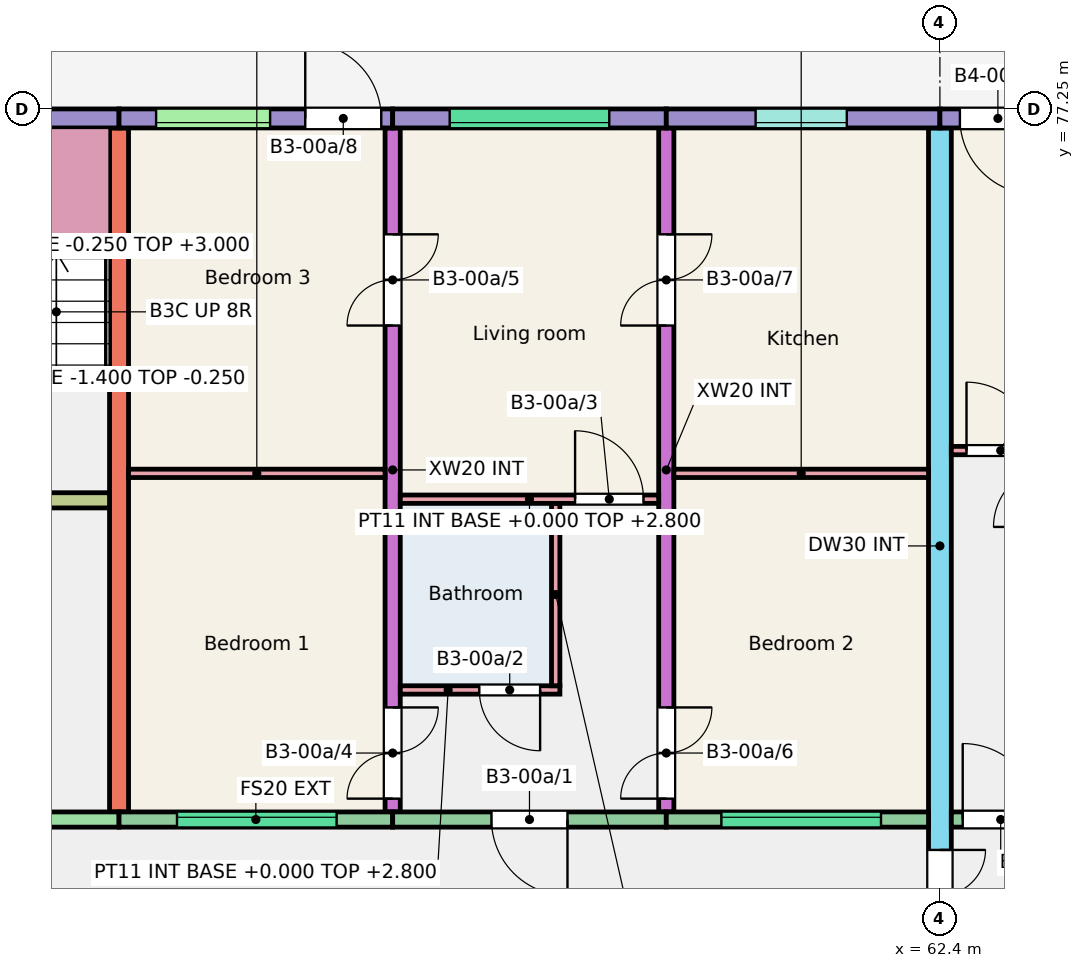
"""IFC4 building model, lengths in metres.
Left out: names, types, materials, properties, quantities, classifications, styles, units other than length and angle.
Written with IfcOpenShell. Run it as: python <this file> out.ifc"""

import sys

from ifc_helpers import new_model, si_unit, direction, frame, frame_2d, origin, place, context, subcontext, project, spatial, rectangle, extrude, element, fill, save


model = new_model("IFC4")
c1 = context("Model", 3, precision=1e-05, world=origin(), true_north=direction((0.0, 1.0)))
c2 = subcontext(c1, "Body", "Model", "MODEL_VIEW")
j1 = project(units=[si_unit("LENGTHUNIT", "METRE"), si_unit("PLANEANGLEUNIT", "RADIAN")], contexts=[c1])
p1 = place(None, origin())
s1 = spatial("IfcSite", under=j1, at=p1, CompositionType="ELEMENT")
p2 = place(p1, origin())
s2 = spatial("IfcBuilding", under=s1, at=p2, CompositionType="ELEMENT")
p3 = place(p2, origin())
s3 = spatial("IfcBuildingStorey", under=s2, at=p3, CompositionType="ELEMENT", Elevation=0.0)
p4 = place(p3, frame((51.6, 68.0, -0.25), z_axis=(0.0, 0.0, 1.0), x_axis=(0.0, 1.0, 0.0)))
e1 = element("IfcWall", 1, at=p4, inside=s3, PredefinedType="SHEAR", context=c2, shape_type="SweptSolid", body=[
    extrude(rectangle(XDim=9.0, YDim=0.25, at=frame_2d((4.5, 0.0))), origin(), (0.0, 0.0, 1.0), 3.25),
])
p5 = place(p3, frame((55.2, 68.0, -0.25), z_axis=(0.0, 0.0, 1.0), x_axis=(0.0, 1.0, 0.0)))
e2 = element("IfcWall", 2, at=p5, inside=s3, PredefinedType="SHEAR", context=c2, shape_type="SweptSolid", body=[
    extrude(rectangle(XDim=9.0, YDim=0.2, at=frame_2d((4.5, 0.0))), origin(), (0.0, 0.0, 1.0), 3.25),
])
p6 = place(p5, frame((0.175, 0.0, 0.25)))
e3 = element("IfcOpeningElement", 3, at=p6, cuts=e2, PredefinedType="OPENING", context=c2, shape_type="SweptSolid", body=[
    extrude(rectangle(XDim=1.2, YDim=2.1, at=frame_2d((0.6, 1.05))), frame((0.0, 0.11, 0.0), z_axis=(0.0, -1.0, 0.0), x_axis=(1.0, 0.0, 0.0)), (0.0, 0.0, 1.0), 0.22),
])
p7 = place(p5, frame((6.4, 0.0, 0.25)))
e4 = element("IfcOpeningElement", 4, at=p7, cuts=e2, PredefinedType="OPENING", context=c2, shape_type="SweptSolid", body=[
    extrude(rectangle(XDim=1.2, YDim=2.1, at=frame_2d((0.6, 1.05))), frame((0.0, 0.11, 0.0), z_axis=(0.0, -1.0, 0.0), x_axis=(1.0, 0.0, 0.0)), (0.0, 0.0, 1.0), 0.22),
])
p8 = place(p3, frame((58.8, 68.0, -0.25), z_axis=(0.0, 0.0, 1.0), x_axis=(0.0, 1.0, 0.0)))
e5 = element("IfcWall", 5, at=p8, inside=s3, PredefinedType="SHEAR", context=c2, shape_type="SweptSolid", body=[
    extrude(rectangle(XDim=9.0, YDim=0.2, at=frame_2d((4.5, 0.0))), origin(), (0.0, 0.0, 1.0), 3.25),
])
p9 = place(p8, frame((0.175, 0.0, 0.25)))
e6 = element("IfcOpeningElement", 6, at=p9, cuts=e5, PredefinedType="OPENING", context=c2, shape_type="SweptSolid", body=[
    extrude(rectangle(XDim=1.2, YDim=2.1, at=frame_2d((0.6, 1.05))), frame((0.0, 0.11, 0.0), z_axis=(0.0, -1.0, 0.0), x_axis=(1.0, 0.0, 0.0)), (0.0, 0.0, 1.0), 0.22),
])
p10 = place(p8, frame((6.4, 0.0, 0.25)))
e7 = element("IfcOpeningElement", 7, at=p10, cuts=e5, PredefinedType="OPENING", context=c2, shape_type="SweptSolid", body=[
    extrude(rectangle(XDim=1.2, YDim=2.1, at=frame_2d((0.6, 1.05))), frame((0.0, 0.11, 0.0), z_axis=(0.0, -1.0, 0.0), x_axis=(1.0, 0.0, 0.0)), (0.0, 0.0, 1.0), 0.22),
])
p11 = place(p3, frame((62.4, 66.0, -0.25), z_axis=(0.0, 0.0, 1.0), x_axis=(0.0, 1.0, 0.0)))
e8 = element("IfcWall", 8, at=p11, inside=s3, PredefinedType="SHEAR", context=c2, shape_type="SweptSolid", body=[
    extrude(rectangle(XDim=11.0, YDim=0.3, at=frame_2d((5.5, 0.0))), origin(), (0.0, 0.0, 1.0), 3.25),
])
p12 = place(p11, frame((0.3, 0.0, 0.25)))
e9 = element("IfcOpeningElement", 9, at=p12, cuts=e8, PredefinedType="OPENING", context=c2, shape_type="SweptSolid", body=[
    extrude(rectangle(XDim=1.2, YDim=2.1, at=frame_2d((0.6, 1.05))), frame((0.0, 0.16, 0.0), z_axis=(0.0, -1.0, 0.0), x_axis=(1.0, 0.0, 0.0)), (0.0, 0.0, 1.0), 0.32),
])
p13 = place(p3, frame((45.6, 77.125, -0.25), z_axis=(0.0, 0.0, 1.0), x_axis=(1.0, 0.0, 0.0)))
e10 = element("IfcWall", 10, at=p13, inside=s3, PredefinedType="SOLIDWALL", context=c2, shape_type="SweptSolid", body=[
    extrude(rectangle(XDim=6.0, YDim=0.25, at=frame_2d((3.0, 0.0))), origin(), (0.0, 0.0, 1.0), 3.25),
])
p14 = place(p13, frame((3.875, 0.0, 0.25)))
e11 = element("IfcOpeningElement", 11, at=p14, cuts=e10, PredefinedType="OPENING", context=c2, shape_type="SweptSolid", body=[
    extrude(rectangle(XDim=1.1, YDim=2.1, at=frame_2d((0.55, 1.05))), frame((0.0, 0.135, 0.0), z_axis=(0.0, -1.0, 0.0), x_axis=(1.0, 0.0, 0.0)), (0.0, 0.0, 1.0), 0.27),
])
p15 = place(p3, frame((45.75, 67.9, -0.25), z_axis=(0.0, 0.0, 1.0), x_axis=(1.0, 0.0, 0.0)))
e12 = element("IfcWall", 12, at=p15, inside=s3, PredefinedType="SHEAR", context=c2, shape_type="SweptSolid", body=[
    extrude(rectangle(XDim=5.85, YDim=0.2, at=frame_2d((2.925, 0.0))), origin(), (0.0, 0.0, 1.0), 3.25),
])
p16 = place(p15, frame((2.312, 0.0, 0.25)))
e13 = element("IfcOpeningElement", 13, at=p16, cuts=e12, PredefinedType="OPENING", context=c2, shape_type="SweptSolid", body=[
    extrude(rectangle(XDim=1.1, YDim=2.1, at=frame_2d((0.55, 1.05))), frame((0.0, 0.11, 0.0), z_axis=(0.0, -1.0, 0.0), x_axis=(1.0, 0.0, 0.0)), (0.0, 0.0, 1.0), 0.22),
])
p17 = place(p3, frame((45.75, 72.1, -0.25), z_axis=(0.0, 0.0, 1.0), x_axis=(1.0, 0.0, 0.0)))
e14 = element("IfcWall", 14, at=p17, inside=s3, PredefinedType="SHEAR", context=c2, shape_type="SweptSolid", body=[
    extrude(rectangle(XDim=5.725, YDim=0.2, at=frame_2d((2.863, 0.0))), origin(), (0.0, 0.0, 1.0), 3.25),
])
p18 = place(p17, frame((3.775, 0.0, 0.25)))
e15 = element("IfcOpeningElement", 15, at=p18, cuts=e14, PredefinedType="OPENING", context=c2, shape_type="SweptSolid", body=[
    extrude(rectangle(XDim=1.0, YDim=2.1, at=frame_2d((0.5, 1.05))), frame((0.0, 0.11, 0.0), z_axis=(0.0, -1.0, 0.0), x_axis=(1.0, 0.0, 0.0)), (0.0, 0.0, 1.0), 0.22),
])
p19 = place(p17, frame((0.762, 0.0, 0.25)))
e16 = element("IfcOpeningElement", 16, at=p19, cuts=e14, PredefinedType="OPENING", context=c2, shape_type="SweptSolid", body=[
    extrude(rectangle(XDim=1.1, YDim=2.1, at=frame_2d((0.55, 1.05))), frame((0.0, 0.11, 0.0), z_axis=(0.0, -1.0, 0.0), x_axis=(1.0, 0.0, 0.0)), (0.0, 0.0, 1.0), 0.22),
])
p20 = place(p3, frame((51.6, 77.125, -0.25), z_axis=(0.0, 0.0, 1.0), x_axis=(1.0, 0.0, 0.0)))
e17 = element("IfcWall", 17, at=p20, inside=s3, PredefinedType="SOLIDWALL", context=c2, shape_type="SweptSolid", body=[
    extrude(rectangle(XDim=3.6, YDim=0.25, at=frame_2d((1.8, 0.0))), origin(), (0.0, 0.0, 1.0), 3.25),
])
p21 = place(p20, frame((0.488, 0.0, 1.45)))
e18 = element("IfcOpeningElement", 18, at=p21, cuts=e17, PredefinedType="OPENING", context=c2, shape_type="SweptSolid", body=[
    extrude(rectangle(XDim=1.5, YDim=1.2, at=frame_2d((0.75, 0.6))), frame((0.0, 0.135, 0.0), z_axis=(0.0, -1.0, 0.0), x_axis=(1.0, 0.0, 0.0)), (0.0, 0.0, 1.0), 0.27),
])
p22 = place(p20, frame((2.45, 0.0, 0.25)))
e19 = element("IfcOpeningElement", 19, at=p22, cuts=e17, PredefinedType="OPENING", context=c2, shape_type="SweptSolid", body=[
    extrude(rectangle(XDim=1.0, YDim=2.1, at=frame_2d((0.5, 1.05))), frame((0.0, 0.135, 0.0), z_axis=(0.0, -1.0, 0.0), x_axis=(1.0, 0.0, 0.0)), (0.0, 0.0, 1.0), 0.27),
])
p23 = place(p3, frame((51.6, 67.9, -0.25), z_axis=(0.0, 0.0, 1.0), x_axis=(1.0, 0.0, 0.0)))
e20 = element("IfcWall", 20, at=p23, inside=s3, PredefinedType="SOLIDWALL", context=c2, shape_type="SweptSolid", body=[
    extrude(rectangle(XDim=3.6, YDim=0.2, at=frame_2d((1.8, 0.0))), origin(), (0.0, 0.0, 1.0), 3.25),
])
p24 = place(p23, frame((0.762, 0.0, 1.45)))
e21 = element("IfcOpeningElement", 21, at=p24, cuts=e20, PredefinedType="OPENING", context=c2, shape_type="SweptSolid", body=[
    extrude(rectangle(XDim=2.1, YDim=1.2, at=frame_2d((1.05, 0.6))), frame((0.0, 0.11, 0.0), z_axis=(0.0, -1.0, 0.0), x_axis=(1.0, 0.0, 0.0)), (0.0, 0.0, 1.0), 0.22),
])
p25 = place(p3, frame((55.2, 77.125, -0.25), z_axis=(0.0, 0.0, 1.0), x_axis=(1.0, 0.0, 0.0)))
e22 = element("IfcWall", 22, at=p25, inside=s3, PredefinedType="SOLIDWALL", context=c2, shape_type="SweptSolid", body=[
    extrude(rectangle(XDim=3.6, YDim=0.25, at=frame_2d((1.8, 0.0))), origin(), (0.0, 0.0, 1.0), 3.25),
])
p26 = place(p25, frame((0.75, 0.0, 1.45)))
e23 = element("IfcOpeningElement", 23, at=p26, cuts=e22, PredefinedType="OPENING", context=c2, shape_type="SweptSolid", body=[
    extrude(rectangle(XDim=2.1, YDim=1.2, at=frame_2d((1.05, 0.6))), frame((0.0, 0.135, 0.0), z_axis=(0.0, -1.0, 0.0), x_axis=(1.0, 0.0, 0.0)), (0.0, 0.0, 1.0), 0.27),
])
p27 = place(p3, frame((55.2, 67.9, -0.25), z_axis=(0.0, 0.0, 1.0), x_axis=(1.0, 0.0, 0.0)))
e24 = element("IfcWall", 24, at=p27, inside=s3, PredefinedType="SOLIDWALL", context=c2, shape_type="SweptSolid", body=[
    extrude(rectangle(XDim=3.6, YDim=0.2, at=frame_2d((1.8, 0.0))), origin(), (0.0, 0.0, 1.0), 3.25),
])
p28 = place(p27, frame((1.3, 0.0, 0.25)))
e25 = element("IfcOpeningElement", 25, at=p28, cuts=e24, PredefinedType="OPENING", context=c2, shape_type="SweptSolid", body=[
    extrude(rectangle(XDim=1.0, YDim=2.1, at=frame_2d((0.5, 1.05))), frame((0.0, 0.11, 0.0), z_axis=(0.0, -1.0, 0.0), x_axis=(1.0, 0.0, 0.0)), (0.0, 0.0, 1.0), 0.22),
])
p29 = place(p3, frame((58.8, 77.125, -0.25), z_axis=(0.0, 0.0, 1.0), x_axis=(1.0, 0.0, 0.0)))
e26 = element("IfcWall", 26, at=p29, inside=s3, PredefinedType="SOLIDWALL", context=c2, shape_type="SweptSolid", body=[
    extrude(rectangle(XDim=3.6, YDim=0.25, at=frame_2d((1.8, 0.0))), origin(), (0.0, 0.0, 1.0), 3.25),
])
p30 = place(p29, frame((1.175, 0.0, 1.35)))
e27 = element("IfcOpeningElement", 27, at=p30, cuts=e26, PredefinedType="OPENING", context=c2, shape_type="SweptSolid", body=[
    extrude(rectangle(XDim=1.2, YDim=1.3, at=frame_2d((0.6, 0.65))), frame((0.0, 0.135, 0.0), z_axis=(0.0, -1.0, 0.0), x_axis=(1.0, 0.0, 0.0)), (0.0, 0.0, 1.0), 0.27),
])
p31 = place(p3, frame((58.8, 67.9, -0.25), z_axis=(0.0, 0.0, 1.0), x_axis=(1.0, 0.0, 0.0)))
e28 = element("IfcWall", 28, at=p31, inside=s3, PredefinedType="SOLIDWALL", context=c2, shape_type="SweptSolid", body=[
    extrude(rectangle(XDim=3.45, YDim=0.2, at=frame_2d((1.725, 0.0))), origin(), (0.0, 0.0, 1.0), 3.25),
])
p32 = place(p31, frame((0.725, 0.0, 1.45)))
e29 = element("IfcOpeningElement", 29, at=p32, cuts=e28, PredefinedType="OPENING", context=c2, shape_type="SweptSolid", body=[
    extrude(rectangle(XDim=2.1, YDim=1.2, at=frame_2d((1.05, 0.6))), frame((0.0, 0.11, 0.0), z_axis=(0.0, -1.0, 0.0), x_axis=(1.0, 0.0, 0.0)), (0.0, 0.0, 1.0), 0.22),
])
p33 = place(p3, frame((62.4, 77.125, -0.25), z_axis=(0.0, 0.0, 1.0), x_axis=(1.0, 0.0, 0.0)))
e30 = element("IfcWall", 30, at=p33, inside=s3, PredefinedType="SOLIDWALL", context=c2, shape_type="SweptSolid", body=[
    extrude(rectangle(XDim=3.6, YDim=0.25, at=frame_2d((1.8, 0.0))), origin(), (0.0, 0.0, 1.0), 3.25),
])
p34 = place(p33, frame((1.669, 0.0, 1.45)))
e31 = element("IfcOpeningElement", 31, at=p34, cuts=e30, PredefinedType="OPENING", context=c2, shape_type="SweptSolid", body=[
    extrude(rectangle(XDim=1.5, YDim=1.2, at=frame_2d((0.75, 0.6))), frame((0.0, 0.135, 0.0), z_axis=(0.0, -1.0, 0.0), x_axis=(1.0, 0.0, 0.0)), (0.0, 0.0, 1.0), 0.27),
])
p35 = place(p33, frame((0.263, 0.0, 0.25)))
e32 = element("IfcOpeningElement", 32, at=p35, cuts=e30, PredefinedType="OPENING", context=c2, shape_type="SweptSolid", body=[
    extrude(rectangle(XDim=1.0, YDim=2.1, at=frame_2d((0.5, 1.05))), frame((0.0, 0.135, 0.0), z_axis=(0.0, -1.0, 0.0), x_axis=(1.0, 0.0, 0.0)), (0.0, 0.0, 1.0), 0.27),
])
p36 = place(p3, frame((62.55, 67.9, -0.25), z_axis=(0.0, 0.0, 1.0), x_axis=(1.0, 0.0, 0.0)))
e33 = element("IfcWall", 33, at=p36, inside=s3, PredefinedType="SOLIDWALL", context=c2, shape_type="SweptSolid", body=[
    extrude(rectangle(XDim=3.45, YDim=0.2, at=frame_2d((1.725, 0.0))), origin(), (0.0, 0.0, 1.0), 3.25),
])
p37 = place(p36, frame((1.768, 0.0, 1.35)))
e34 = element("IfcOpeningElement", 34, at=p37, cuts=e33, PredefinedType="OPENING", context=c2, shape_type="SweptSolid", body=[
    extrude(rectangle(XDim=1.2, YDim=1.3, at=frame_2d((0.6, 0.65))), frame((0.0, 0.11, 0.0), z_axis=(0.0, -1.0, 0.0), x_axis=(1.0, 0.0, 0.0)), (0.0, 0.0, 1.0), 0.22),
])
p38 = place(p36, frame((0.15, 0.0, 0.25)))
e35 = element("IfcOpeningElement", 35, at=p38, cuts=e33, PredefinedType="OPENING", context=c2, shape_type="SweptSolid", body=[
    extrude(rectangle(XDim=1.0, YDim=2.1, at=frame_2d((0.5, 1.05))), frame((0.0, 0.11, 0.0), z_axis=(0.0, -1.0, 0.0), x_axis=(1.0, 0.0, 0.0)), (0.0, 0.0, 1.0), 0.22),
])
p39 = place(p3, frame((55.3, 69.605, 0.0), z_axis=(0.0, 0.0, 1.0), x_axis=(1.0, 0.0, 0.0)))
e36 = element("IfcWall", 36, at=p39, inside=s3, PredefinedType="PARTITIONING", context=c2, shape_type="SweptSolid", body=[
    extrude(rectangle(XDim=2.1, YDim=0.11, at=frame_2d((1.05, 0.0))), origin(), (0.0, 0.0, 1.0), 2.8),
])
p40 = place(p39, frame((1.04, 0.0, 0.0)))
e37 = element("IfcOpeningElement", 37, at=p40, cuts=e36, PredefinedType="OPENING", context=c2, shape_type="SweptSolid", body=[
    extrude(rectangle(XDim=0.8, YDim=2.1, at=frame_2d((0.4, 1.05))), frame((0.0, 0.065, 0.0), z_axis=(0.0, -1.0, 0.0), x_axis=(1.0, 0.0, 0.0)), (0.0, 0.0, 1.0), 0.13),
])
p41 = place(p3, frame((57.345, 69.66, 0.0), z_axis=(0.0, 0.0, 1.0), x_axis=(0.0, 1.0, 0.0)))
e38 = element("IfcWall", 38, at=p41, inside=s3, PredefinedType="PARTITIONING", context=c2, shape_type="SweptSolid", body=[
    extrude(rectangle(XDim=2.4, YDim=0.11, at=frame_2d((1.2, 0.0))), origin(), (0.0, 0.0, 1.0), 2.8),
])
p42 = place(p3, frame((55.3, 72.115, 0.0), z_axis=(0.0, 0.0, 1.0), x_axis=(1.0, 0.0, 0.0)))
e39 = element("IfcWall", 39, at=p42, inside=s3, PredefinedType="PARTITIONING", context=c2, shape_type="SweptSolid", body=[
    extrude(rectangle(XDim=3.4, YDim=0.11, at=frame_2d((1.7, 0.0))), origin(), (0.0, 0.0, 1.0), 2.8),
])
p43 = place(p42, frame((2.3, 0.0, 0.0)))
e40 = element("IfcOpeningElement", 40, at=p43, cuts=e39, PredefinedType="OPENING", context=c2, shape_type="SweptSolid", body=[
    extrude(rectangle(XDim=0.9, YDim=2.1, at=frame_2d((0.45, 1.05))), frame((0.0, 0.065, 0.0), z_axis=(0.0, -1.0, 0.0), x_axis=(1.0, 0.0, 0.0)), (0.0, 0.0, 1.0), 0.13),
])
p44 = place(p3, frame((51.725, 72.455, 0.0), z_axis=(0.0, 0.0, 1.0), x_axis=(1.0, 0.0, 0.0)))
e41 = element("IfcWall", 41, at=p44, inside=s3, PredefinedType="PARTITIONING", context=c2, shape_type="SweptSolid", body=[
    extrude(rectangle(XDim=3.375, YDim=0.11, at=frame_2d((1.688, 0.0))), origin(), (0.0, 0.0, 1.0), 2.8),
])
p45 = place(p3, frame((58.9, 72.455, 0.0), z_axis=(0.0, 0.0, 1.0), x_axis=(1.0, 0.0, 0.0)))
e42 = element("IfcWall", 42, at=p45, inside=s3, PredefinedType="PARTITIONING", context=c2, shape_type="SweptSolid", body=[
    extrude(rectangle(XDim=3.35, YDim=0.11, at=frame_2d((1.675, 0.0))), origin(), (0.0, 0.0, 1.0), 2.8),
])
p46 = place(p3, frame((62.55, 72.755, 0.0), z_axis=(0.0, 0.0, 1.0), x_axis=(1.0, 0.0, 0.0)))
e43 = element("IfcWall", 43, at=p46, inside=s3, PredefinedType="PARTITIONING", context=c2, shape_type="SweptSolid", body=[
    extrude(rectangle(XDim=3.325, YDim=0.11, at=frame_2d((1.663, 0.0))), origin(), (0.0, 0.0, 1.0), 2.8),
])
p47 = place(p46, frame((0.2, 0.0, 0.0)))
e44 = element("IfcOpeningElement", 44, at=p47, cuts=e43, PredefinedType="OPENING", context=c2, shape_type="SweptSolid", body=[
    extrude(rectangle(XDim=0.9, YDim=2.1, at=frame_2d((0.45, 1.05))), frame((0.0, 0.065, 0.0), z_axis=(0.0, -1.0, 0.0), x_axis=(1.0, 0.0, 0.0)), (0.0, 0.0, 1.0), 0.13),
])
p48 = place(p24, origin())
e45 = element("IfcWindow", 45, at=p48, inside=s3, PartitioningType="SINGLE_PANEL", PredefinedType="WINDOW", context=c2, shape_type="SweptSolid", body=[
    extrude(rectangle(XDim=2.1, YDim=1.2, at=frame_2d((1.05, 0.6))), frame((0.0, 0.06, 0.0), z_axis=(0.0, -1.0, 0.0), x_axis=(1.0, 0.0, 0.0)), (0.0, 0.0, 1.0), 0.06),
])
fill(e21, e45)
p49 = place(p21, origin())
e46 = element("IfcWindow", 46, at=p49, inside=s3, PartitioningType="SINGLE_PANEL", PredefinedType="WINDOW", context=c2, shape_type="SweptSolid", body=[
    extrude(rectangle(XDim=1.5, YDim=1.2, at=frame_2d((0.75, 0.6))), frame((0.0, -0.025, 0.0), z_axis=(0.0, -1.0, 0.0), x_axis=(1.0, 0.0, 0.0)), (0.0, 0.0, 1.0), 0.06),
])
fill(e18, e46)
p50 = place(p32, origin())
e47 = element("IfcWindow", 47, at=p50, inside=s3, PartitioningType="SINGLE_PANEL", PredefinedType="WINDOW", context=c2, shape_type="SweptSolid", body=[
    extrude(rectangle(XDim=2.1, YDim=1.2, at=frame_2d((1.05, 0.6))), frame((0.0, 0.06, 0.0), z_axis=(0.0, -1.0, 0.0), x_axis=(1.0, 0.0, 0.0)), (0.0, 0.0, 1.0), 0.06),
])
fill(e29, e47)
p51 = place(p30, origin())
e48 = element("IfcWindow", 48, at=p51, inside=s3, PartitioningType="SINGLE_PANEL", PredefinedType="WINDOW", context=c2, shape_type="SweptSolid", body=[
    extrude(rectangle(XDim=1.2, YDim=1.3, at=frame_2d((0.6, 0.65))), frame((0.0, -0.025, 0.0), z_axis=(0.0, -1.0, 0.0), x_axis=(1.0, 0.0, 0.0)), (0.0, 0.0, 1.0), 0.06),
])
fill(e27, e48)
p52 = place(p26, origin())
e49 = element("IfcWindow", 49, at=p52, inside=s3, PartitioningType="SINGLE_PANEL", PredefinedType="WINDOW", context=c2, shape_type="SweptSolid", body=[
    extrude(rectangle(XDim=2.1, YDim=1.2, at=frame_2d((1.05, 0.6))), frame((0.0, -0.025, 0.0), z_axis=(0.0, -1.0, 0.0), x_axis=(1.0, 0.0, 0.0)), (0.0, 0.0, 1.0), 0.06),
])
fill(e23, e49)
p53 = place(p28, origin())
e50 = element("IfcDoor", 50, at=p53, inside=s3, OperationType="SINGLE_SWING_RIGHT", PredefinedType="DOOR", context=c2, shape_type="SweptSolid", body=[
    extrude(rectangle(XDim=1.0, YDim=2.1, at=frame_2d((0.5, 1.05))), frame((0.0, 0.025, 0.0), z_axis=(0.0, -1.0, 0.0), x_axis=(1.0, 0.0, 0.0)), (0.0, 0.0, 1.0), 0.05),
])
fill(e25, e50)
p54 = place(p40, origin())
e51 = element("IfcDoor", 51, at=p54, inside=s3, OperationType="SINGLE_SWING_RIGHT", PredefinedType="DOOR", context=c2, shape_type="SweptSolid", body=[
    extrude(rectangle(XDim=0.8, YDim=2.1, at=frame_2d((0.4, 1.05))), frame((0.0, 0.025, 0.0), z_axis=(0.0, -1.0, 0.0), x_axis=(1.0, 0.0, 0.0)), (0.0, 0.0, 1.0), 0.05),
])
fill(e37, e51)
p55 = place(p43, origin())
e52 = element("IfcDoor", 52, at=p55, inside=s3, OperationType="SINGLE_SWING_LEFT", PredefinedType="DOOR", context=c2, shape_type="SweptSolid", body=[
    extrude(rectangle(XDim=0.9, YDim=2.1, at=frame_2d((0.45, 1.05))), frame((0.0, 0.025, 0.0), z_axis=(0.0, -1.0, 0.0), x_axis=(1.0, 0.0, 0.0)), (0.0, 0.0, 1.0), 0.05),
])
fill(e40, e52)
p56 = place(p6, origin())
e53 = element("IfcDoor", 53, at=p56, inside=s3, OperationType="DOUBLE_DOOR_SINGLE_SWING", PredefinedType="DOOR", context=c2, shape_type="SweptSolid", body=[
    extrude(rectangle(XDim=1.2, YDim=2.1, at=frame_2d((0.6, 1.05))), frame((0.0, 0.025, 0.0), z_axis=(0.0, -1.0, 0.0), x_axis=(1.0, 0.0, 0.0)), (0.0, 0.0, 1.0), 0.05),
])
fill(e3, e53)
p57 = place(p7, origin())
e54 = element("IfcDoor", 54, at=p57, inside=s3, OperationType="DOUBLE_DOOR_SINGLE_SWING", PredefinedType="DOOR", context=c2, shape_type="SweptSolid", body=[
    extrude(rectangle(XDim=1.2, YDim=2.1, at=frame_2d((0.6, 1.05))), frame((0.0, 0.025, 0.0), z_axis=(0.0, -1.0, 0.0), x_axis=(1.0, 0.0, 0.0)), (0.0, 0.0, 1.0), 0.05),
])
fill(e4, e54)
p58 = place(p9, origin())
e55 = element("IfcDoor", 55, at=p58, inside=s3, OperationType="DOUBLE_DOOR_SINGLE_SWING", PredefinedType="DOOR", context=c2, shape_type="SweptSolid", body=[
    extrude(rectangle(XDim=1.2, YDim=2.1, at=frame_2d((0.6, 1.05))), frame((0.0, 0.025, 0.0), z_axis=(0.0, -1.0, 0.0), x_axis=(1.0, 0.0, 0.0)), (0.0, 0.0, 1.0), 0.05),
])
fill(e6, e55)
p59 = place(p10, origin())
e56 = element("IfcDoor", 56, at=p59, inside=s3, OperationType="DOUBLE_DOOR_SINGLE_SWING", PredefinedType="DOOR", context=c2, shape_type="SweptSolid", body=[
    extrude(rectangle(XDim=1.2, YDim=2.1, at=frame_2d((0.6, 1.05))), frame((0.0, 0.025, 0.0), z_axis=(0.0, -1.0, 0.0), x_axis=(1.0, 0.0, 0.0)), (0.0, 0.0, 1.0), 0.05),
])
fill(e7, e56)
p60 = place(p22, origin())
e57 = element("IfcDoor", 57, at=p60, inside=s3, OperationType="SINGLE_SWING_LEFT", PredefinedType="DOOR", context=c2, shape_type="SweptSolid", body=[
    extrude(rectangle(XDim=1.0, YDim=2.1, at=frame_2d((0.5, 1.05))), frame((0.0, 0.025, 0.0), z_axis=(0.0, -1.0, 0.0), x_axis=(1.0, 0.0, 0.0)), (0.0, 0.0, 1.0), 0.05),
])
fill(e19, e57)
p61 = place(p38, origin())
e58 = element("IfcDoor", 58, at=p61, inside=s3, OperationType="SINGLE_SWING_LEFT", PredefinedType="DOOR", context=c2, shape_type="SweptSolid", body=[
    extrude(rectangle(XDim=1.0, YDim=2.1, at=frame_2d((0.5, 1.05))), frame((0.0, 0.025, 0.0), z_axis=(0.0, -1.0, 0.0), x_axis=(1.0, 0.0, 0.0)), (0.0, 0.0, 1.0), 0.05),
])
fill(e35, e58)
p62 = place(p47, origin())
e59 = element("IfcDoor", 59, at=p62, inside=s3, OperationType="SINGLE_SWING_LEFT", PredefinedType="DOOR", context=c2, shape_type="SweptSolid", body=[
    extrude(rectangle(XDim=0.9, YDim=2.1, at=frame_2d((0.45, 1.05))), frame((0.0, 0.025, 0.0), z_axis=(0.0, -1.0, 0.0), x_axis=(1.0, 0.0, 0.0)), (0.0, 0.0, 1.0), 0.05),
])
fill(e44, e59)
p63 = place(p35, origin())
e60 = element("IfcDoor", 60, at=p63, inside=s3, OperationType="SINGLE_SWING_RIGHT", PredefinedType="DOOR", context=c2, shape_type="SweptSolid", body=[
    extrude(rectangle(XDim=1.0, YDim=2.1, at=frame_2d((0.5, 1.05))), frame((0.0, 0.025, 0.0), z_axis=(0.0, -1.0, 0.0), x_axis=(1.0, 0.0, 0.0)), (0.0, 0.0, 1.0), 0.05),
])
fill(e32, e60)
p64 = place(p12, origin())
e61 = element("IfcDoor", 61, at=p64, inside=s3, OperationType="DOUBLE_DOOR_SINGLE_SWING", PredefinedType="DOOR", context=c2, shape_type="SweptSolid", body=[
    extrude(rectangle(XDim=1.2, YDim=2.1, at=frame_2d((0.6, 1.05))), frame((0.0, 0.025, 0.0), z_axis=(0.0, -1.0, 0.0), x_axis=(1.0, 0.0, 0.0)), (0.0, 0.0, 1.0), 0.05),
])
fill(e9, e61)
save(model, sys.argv[1])
